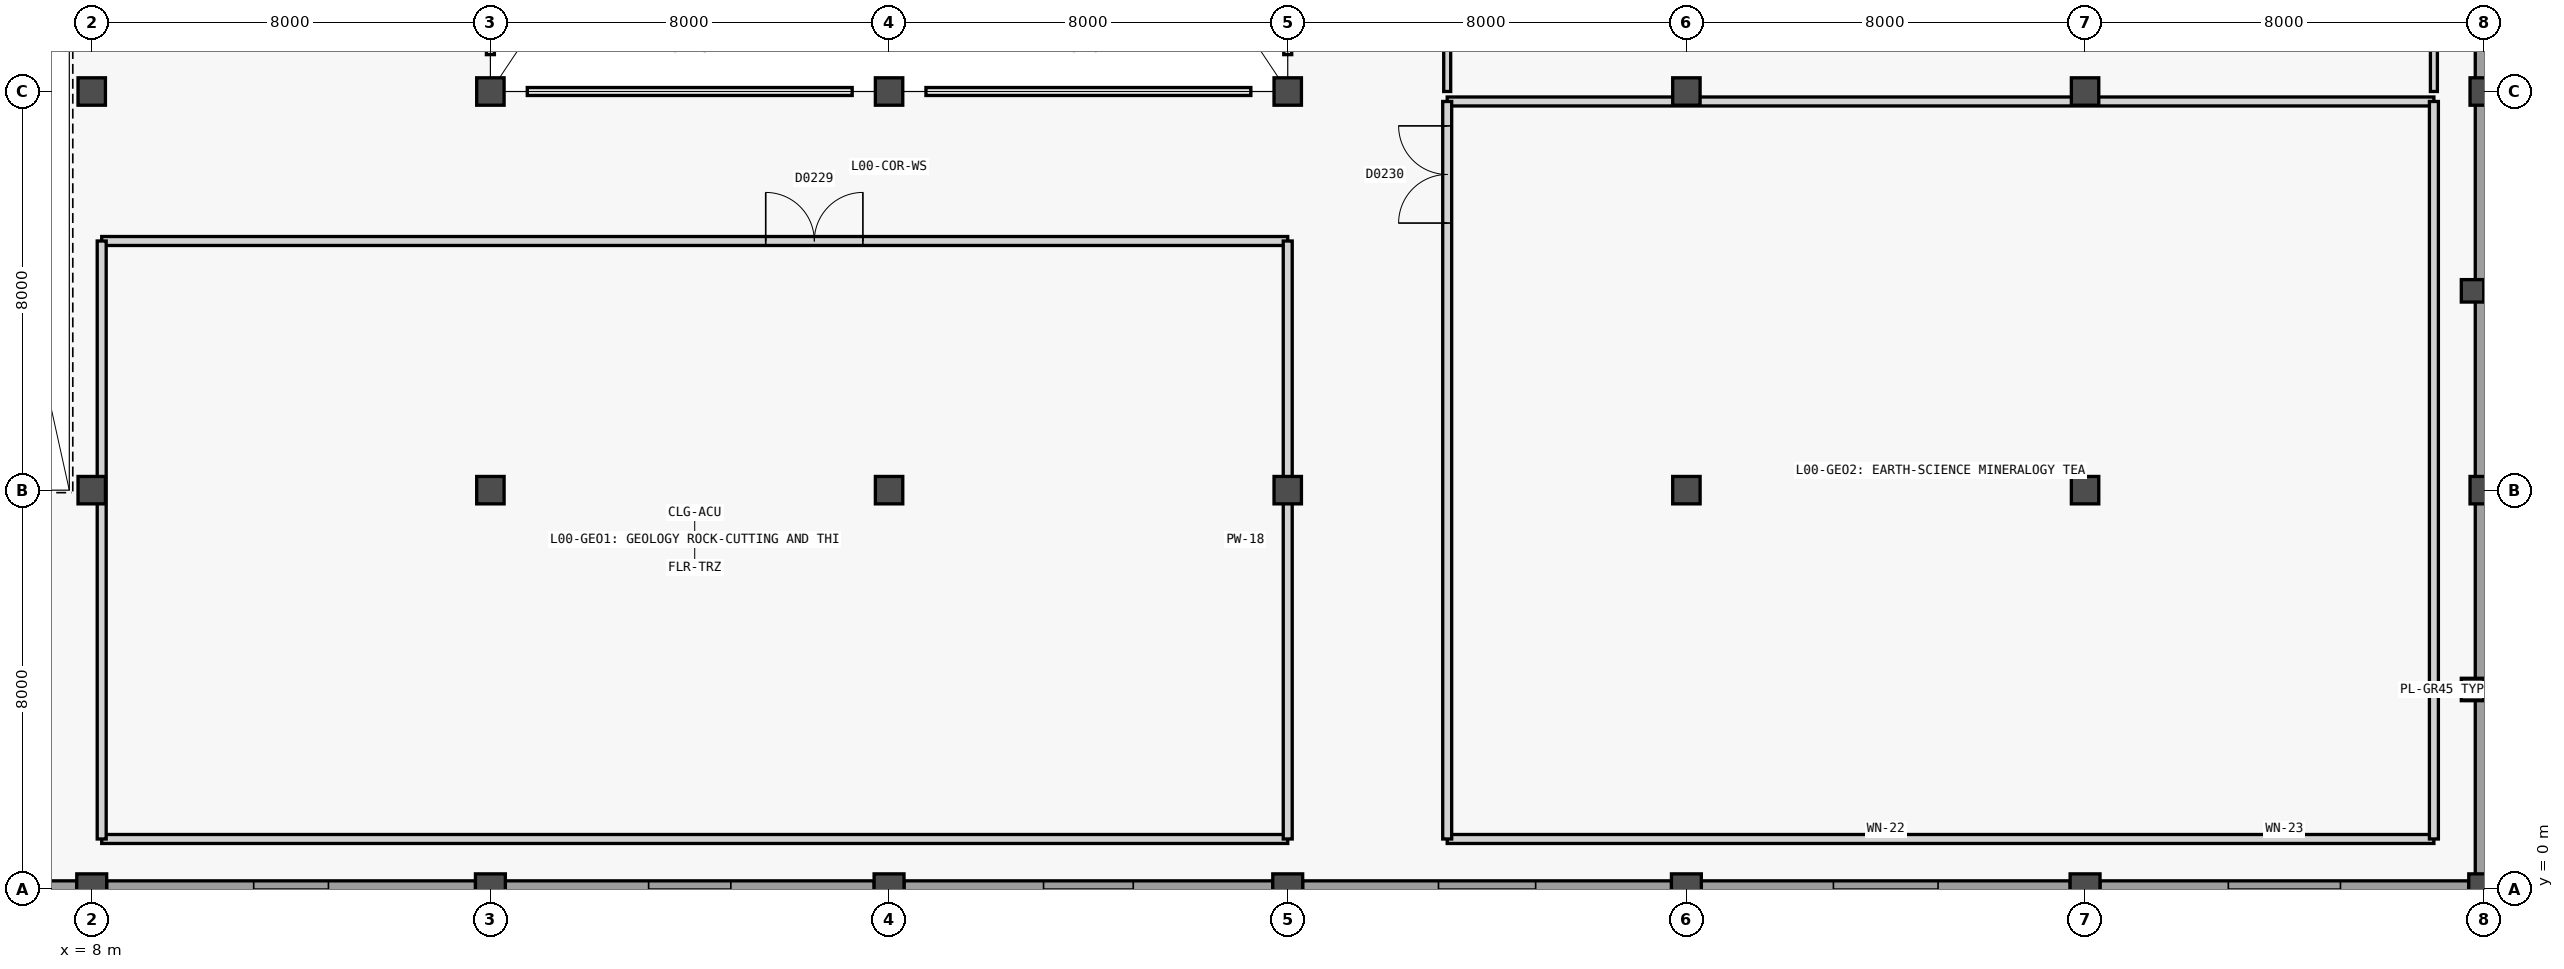
"""IFC4 building model, lengths in metres.
Left out: names, types, materials, properties, quantities, classifications, styles, units other than length and angle.
Written with IfcOpenShell. Run it as: python <this file> out.ifc"""

import sys

from ifc_helpers import new_model, si_unit, direction, frame, frame_2d, origin, origin_2d, place, context, subcontext, project, spatial, rectangle, extrude, element, fill, save


model = new_model("IFC4")
c1 = context("Model", 3, precision=1e-05, world=origin(), true_north=direction((0.0, 1.0)))
c2 = subcontext(c1, "Body", "Model", "MODEL_VIEW")
j1 = project(units=[si_unit("LENGTHUNIT", "METRE"), si_unit("PLANEANGLEUNIT", "RADIAN")], contexts=[c1])
p1 = place(None, origin())
s1 = spatial("IfcSite", under=j1, at=p1, CompositionType="ELEMENT")
p2 = place(p1, origin())
s2 = spatial("IfcBuilding", under=s1, at=p2, CompositionType="ELEMENT")
p3 = place(p2, origin())
s3 = spatial("IfcBuildingStorey", under=s2, at=p3, CompositionType="ELEMENT", Elevation=0.0)
p4 = place(p3, frame((8.0, 0.0, 0.0), z_axis=(0.0, 0.0, 1.0), x_axis=(1.0, 0.0, 0.0)))
e1 = element("IfcColumn", 1, at=p4, inside=s3, PredefinedType="COLUMN", context=c2, shape_type="SweptSolid", body=[
    extrude(rectangle(XDim=0.6, YDim=0.6, at=origin_2d()), origin(), (0.0, 0.0, 1.0), 5.4),
])
for number, where, z_axis, x_axis in (
    (2, (8.0, 8.0, 0.0), (0.0, 0.0, 1.0), (1.0, 0.0, 0.0)),
    (3, (8.0, 16.0, 0.0), (0.0, 0.0, 1.0), (1.0, 0.0, 0.0)),
):
    element("IfcColumn", number, at=place(p3, frame(where, z_axis=z_axis, x_axis=x_axis)), inside=s3, PredefinedType="COLUMN", context=c2, shape_type="SweptSolid", body=[
        extrude(rectangle(XDim=0.55, YDim=0.55, at=origin_2d()), origin(), (0.0, 0.0, 1.0), 5.4),
    ])
p5 = place(p3, frame((16.0, 0.0, 0.0), z_axis=(0.0, 0.0, 1.0), x_axis=(1.0, 0.0, 0.0)))
e4 = element("IfcColumn", 4, at=p5, inside=s3, PredefinedType="COLUMN", context=c2, shape_type="SweptSolid", body=[
    extrude(rectangle(XDim=0.6, YDim=0.6, at=origin_2d()), origin(), (0.0, 0.0, 1.0), 5.4),
])
for number, where, z_axis, x_axis in (
    (5, (16.0, 8.0, 0.0), (0.0, 0.0, 1.0), (1.0, 0.0, 0.0)),
    (6, (16.0, 16.0, 0.0), (0.0, 0.0, 1.0), (1.0, 0.0, 0.0)),
):
    element("IfcColumn", number, at=place(p3, frame(where, z_axis=z_axis, x_axis=x_axis)), inside=s3, PredefinedType="COLUMN", context=c2, shape_type="SweptSolid", body=[
        extrude(rectangle(XDim=0.55, YDim=0.55, at=origin_2d()), origin(), (0.0, 0.0, 1.0), 5.4),
    ])
p6 = place(p3, frame((24.0, 0.0, 0.0), z_axis=(0.0, 0.0, 1.0), x_axis=(1.0, 0.0, 0.0)))
e7 = element("IfcColumn", 7, at=p6, inside=s3, PredefinedType="COLUMN", context=c2, shape_type="SweptSolid", body=[
    extrude(rectangle(XDim=0.6, YDim=0.6, at=origin_2d()), origin(), (0.0, 0.0, 1.0), 5.4),
])
for number, where, z_axis, x_axis in (
    (8, (24.0, 8.0, 0.0), (0.0, 0.0, 1.0), (1.0, 0.0, 0.0)),
    (9, (24.0, 16.0, 0.0), (0.0, 0.0, 1.0), (1.0, 0.0, 0.0)),
):
    element("IfcColumn", number, at=place(p3, frame(where, z_axis=z_axis, x_axis=x_axis)), inside=s3, PredefinedType="COLUMN", context=c2, shape_type="SweptSolid", body=[
        extrude(rectangle(XDim=0.55, YDim=0.55, at=origin_2d()), origin(), (0.0, 0.0, 1.0), 5.4),
    ])
p7 = place(p3, frame((32.0, 0.0, 0.0), z_axis=(0.0, 0.0, 1.0), x_axis=(1.0, 0.0, 0.0)))
e10 = element("IfcColumn", 10, at=p7, inside=s3, PredefinedType="COLUMN", context=c2, shape_type="SweptSolid", body=[
    extrude(rectangle(XDim=0.6, YDim=0.6, at=origin_2d()), origin(), (0.0, 0.0, 1.0), 5.4),
])
for number, where, z_axis, x_axis in (
    (11, (32.0, 8.0, 0.0), (0.0, 0.0, 1.0), (1.0, 0.0, 0.0)),
    (12, (32.0, 16.0, 0.0), (0.0, 0.0, 1.0), (1.0, 0.0, 0.0)),
):
    element("IfcColumn", number, at=place(p3, frame(where, z_axis=z_axis, x_axis=x_axis)), inside=s3, PredefinedType="COLUMN", context=c2, shape_type="SweptSolid", body=[
        extrude(rectangle(XDim=0.55, YDim=0.55, at=origin_2d()), origin(), (0.0, 0.0, 1.0), 5.4),
    ])
p8 = place(p3, frame((40.0, 0.0, 0.0), z_axis=(0.0, 0.0, 1.0), x_axis=(1.0, 0.0, 0.0)))
e13 = element("IfcColumn", 13, at=p8, inside=s3, PredefinedType="COLUMN", context=c2, shape_type="SweptSolid", body=[
    extrude(rectangle(XDim=0.6, YDim=0.6, at=origin_2d()), origin(), (0.0, 0.0, 1.0), 5.4),
])
for number, where, z_axis, x_axis in (
    (14, (40.0, 8.0, 0.0), (0.0, 0.0, 1.0), (1.0, 0.0, 0.0)),
    (15, (40.0, 16.0, 0.0), (0.0, 0.0, 1.0), (1.0, 0.0, 0.0)),
):
    element("IfcColumn", number, at=place(p3, frame(where, z_axis=z_axis, x_axis=x_axis)), inside=s3, PredefinedType="COLUMN", context=c2, shape_type="SweptSolid", body=[
        extrude(rectangle(XDim=0.55, YDim=0.55, at=origin_2d()), origin(), (0.0, 0.0, 1.0), 5.4),
    ])
p9 = place(p3, frame((48.0, 0.0, 0.0), z_axis=(0.0, 0.0, 1.0), x_axis=(1.0, 0.0, 0.0)))
e16 = element("IfcColumn", 16, at=p9, inside=s3, PredefinedType="COLUMN", context=c2, shape_type="SweptSolid", body=[
    extrude(rectangle(XDim=0.6, YDim=0.6, at=origin_2d()), origin(), (0.0, 0.0, 1.0), 5.4),
])
for number, where, z_axis, x_axis in (
    (17, (48.0, 8.0, 0.0), (0.0, 0.0, 1.0), (1.0, 0.0, 0.0)),
    (18, (48.0, 16.0, 0.0), (0.0, 0.0, 1.0), (1.0, 0.0, 0.0)),
):
    element("IfcColumn", number, at=place(p3, frame(where, z_axis=z_axis, x_axis=x_axis)), inside=s3, PredefinedType="COLUMN", context=c2, shape_type="SweptSolid", body=[
        extrude(rectangle(XDim=0.55, YDim=0.55, at=origin_2d()), origin(), (0.0, 0.0, 1.0), 5.4),
    ])
p10 = place(p3, frame((56.0, 0.0, 0.0), z_axis=(0.0, 0.0, 1.0), x_axis=(1.0, 0.0, 0.0)))
e19 = element("IfcColumn", 19, at=p10, inside=s3, PredefinedType="COLUMN", context=c2, shape_type="SweptSolid", body=[
    extrude(rectangle(XDim=0.6, YDim=0.6, at=origin_2d()), origin(), (0.0, 0.0, 1.0), 5.4),
])
for number, where, z_axis, x_axis in (
    (20, (56.0, 8.0, 0.0), (0.0, 0.0, 1.0), (1.0, 0.0, 0.0)),
    (21, (56.0, 16.0, 0.0), (0.0, 0.0, 1.0), (1.0, 0.0, 0.0)),
):
    element("IfcColumn", number, at=place(p3, frame(where, z_axis=z_axis, x_axis=x_axis)), inside=s3, PredefinedType="COLUMN", context=c2, shape_type="SweptSolid", body=[
        extrude(rectangle(XDim=0.55, YDim=0.55, at=origin_2d()), origin(), (0.0, 0.0, 1.0), 5.4),
    ])
for number, where, z_axis, x_axis in (
    (22, (55.775, 4.0, 0.0), (0.0, 0.0, 1.0), (1.0, 0.0, 0.0)),
    (23, (55.775, 12.0, 0.0), (0.0, 0.0, 1.0), (1.0, 0.0, 0.0)),
):
    element("IfcColumn", number, at=place(p3, frame(where, z_axis=z_axis, x_axis=x_axis)), inside=s3, PredefinedType="PILASTER", context=c2, shape_type="SweptSolid", body=[
        extrude(rectangle(XDim=0.45, YDim=0.45, at=origin_2d()), origin(), (0.0, 0.0, 1.0), 5.4),
    ])
p11 = place(p3, frame((56.0, 64.0, 0.0), z_axis=(0.0, 0.0, 1.0), x_axis=(0.0, -1.0, 0.0)))
e24 = element("IfcWall", 24, at=p11, inside=s3, PredefinedType="SOLIDWALL", context=c2, shape_type="SweptSolid", body=[
    extrude(rectangle(XDim=64.0, YDim=0.34, at=frame_2d((32.0, 0.0))), origin(), (0.0, 0.0, 1.0), 5.16),
])
p12 = place(p3, frame((7.702, 0.0, 0.0), z_axis=(0.0, 0.0, 1.0), x_axis=(-1.0, 0.0, 0.0)))
e25 = element("IfcWall", 25, at=p12, inside=s3, PredefinedType="SOLIDWALL", context=c2, shape_type="SweptSolid", body=[
    extrude(rectangle(XDim=7.404, YDim=0.32, at=frame_2d((3.702, 0.0))), origin(), (0.0, 0.0, 1.0), 5.14),
])
p13 = place(p12, frame((3.027, 0.0, 0.88)))
e26 = element("IfcOpeningElement", 26, at=p13, cuts=e25, PredefinedType="OPENING", context=c2, shape_type="SweptSolid", body=[
    extrude(rectangle(XDim=1.35, YDim=1.45, at=frame_2d((0.675, 0.725))), frame((0.0, 0.17, 0.0), z_axis=(0.0, -1.0, 0.0), x_axis=(1.0, 0.0, 0.0)), (0.0, 0.0, 1.0), 0.34),
])
p14 = place(p3, frame((15.702, 0.0, 0.0), z_axis=(0.0, 0.0, 1.0), x_axis=(-1.0, 0.0, 0.0)))
e27 = element("IfcWall", 27, at=p14, inside=s3, PredefinedType="SOLIDWALL", context=c2, shape_type="SweptSolid", body=[
    extrude(rectangle(XDim=7.404, YDim=0.32, at=frame_2d((3.702, 0.0))), origin(), (0.0, 0.0, 1.0), 5.14),
])
p15 = place(p14, frame((2.952, 0.0, 0.88)))
e28 = element("IfcOpeningElement", 28, at=p15, cuts=e27, PredefinedType="OPENING", context=c2, shape_type="SweptSolid", body=[
    extrude(rectangle(XDim=1.5, YDim=1.5, at=frame_2d((0.75, 0.75))), frame((0.0, 0.17, 0.0), z_axis=(0.0, -1.0, 0.0), x_axis=(1.0, 0.0, 0.0)), (0.0, 0.0, 1.0), 0.34),
])
p16 = place(p3, frame((23.702, 0.0, 0.0), z_axis=(0.0, 0.0, 1.0), x_axis=(-1.0, 0.0, 0.0)))
e29 = element("IfcWall", 29, at=p16, inside=s3, PredefinedType="SOLIDWALL", context=c2, shape_type="SweptSolid", body=[
    extrude(rectangle(XDim=7.404, YDim=0.32, at=frame_2d((3.702, 0.0))), origin(), (0.0, 0.0, 1.0), 5.14),
])
p17 = place(p16, frame((2.877, 0.0, 0.88)))
e30 = element("IfcOpeningElement", 30, at=p17, cuts=e29, PredefinedType="OPENING", context=c2, shape_type="SweptSolid", body=[
    extrude(rectangle(XDim=1.65, YDim=1.5, at=frame_2d((0.825, 0.75))), frame((0.0, 0.17, 0.0), z_axis=(0.0, -1.0, 0.0), x_axis=(1.0, 0.0, 0.0)), (0.0, 0.0, 1.0), 0.34),
])
p18 = place(p3, frame((31.702, 0.0, 0.0), z_axis=(0.0, 0.0, 1.0), x_axis=(-1.0, 0.0, 0.0)))
e31 = element("IfcWall", 31, at=p18, inside=s3, PredefinedType="SOLIDWALL", context=c2, shape_type="SweptSolid", body=[
    extrude(rectangle(XDim=7.404, YDim=0.32, at=frame_2d((3.702, 0.0))), origin(), (0.0, 0.0, 1.0), 5.14),
])
p19 = place(p18, frame((2.802, 0.0, 0.88)))
e32 = element("IfcOpeningElement", 32, at=p19, cuts=e31, PredefinedType="OPENING", context=c2, shape_type="SweptSolid", body=[
    extrude(rectangle(XDim=1.8, YDim=1.55, at=frame_2d((0.9, 0.775))), frame((0.0, 0.17, 0.0), z_axis=(0.0, -1.0, 0.0), x_axis=(1.0, 0.0, 0.0)), (0.0, 0.0, 1.0), 0.34),
])
p20 = place(p3, frame((39.702, 0.0, 0.0), z_axis=(0.0, 0.0, 1.0), x_axis=(-1.0, 0.0, 0.0)))
e33 = element("IfcWall", 33, at=p20, inside=s3, PredefinedType="SOLIDWALL", context=c2, shape_type="SweptSolid", body=[
    extrude(rectangle(XDim=7.404, YDim=0.32, at=frame_2d((3.702, 0.0))), origin(), (0.0, 0.0, 1.0), 5.14),
])
p21 = place(p20, frame((2.727, 0.0, 0.88)))
e34 = element("IfcOpeningElement", 34, at=p21, cuts=e33, PredefinedType="OPENING", context=c2, shape_type="SweptSolid", body=[
    extrude(rectangle(XDim=1.95, YDim=1.55, at=frame_2d((0.975, 0.775))), frame((0.0, 0.17, 0.0), z_axis=(0.0, -1.0, 0.0), x_axis=(1.0, 0.0, 0.0)), (0.0, 0.0, 1.0), 0.34),
])
p22 = place(p3, frame((47.702, 0.0, 0.0), z_axis=(0.0, 0.0, 1.0), x_axis=(-1.0, 0.0, 0.0)))
e35 = element("IfcWall", 35, at=p22, inside=s3, PredefinedType="SOLIDWALL", context=c2, shape_type="SweptSolid", body=[
    extrude(rectangle(XDim=7.404, YDim=0.32, at=frame_2d((3.702, 0.0))), origin(), (0.0, 0.0, 1.0), 5.14),
])
p23 = place(p22, frame((2.652, 0.0, 0.88)))
e36 = element("IfcOpeningElement", 36, at=p23, cuts=e35, PredefinedType="OPENING", context=c2, shape_type="SweptSolid", body=[
    extrude(rectangle(XDim=2.1, YDim=1.6, at=frame_2d((1.05, 0.8))), frame((0.0, 0.17, 0.0), z_axis=(0.0, -1.0, 0.0), x_axis=(1.0, 0.0, 0.0)), (0.0, 0.0, 1.0), 0.34),
])
p24 = place(p3, frame((55.702, 0.0, 0.0), z_axis=(0.0, 0.0, 1.0), x_axis=(-1.0, 0.0, 0.0)))
e37 = element("IfcWall", 37, at=p24, inside=s3, PredefinedType="SOLIDWALL", context=c2, shape_type="SweptSolid", body=[
    extrude(rectangle(XDim=7.404, YDim=0.32, at=frame_2d((3.702, 0.0))), origin(), (0.0, 0.0, 1.0), 5.14),
])
p25 = place(p24, frame((2.577, 0.0, 0.88)))
e38 = element("IfcOpeningElement", 38, at=p25, cuts=e37, PredefinedType="OPENING", context=c2, shape_type="SweptSolid", body=[
    extrude(rectangle(XDim=2.25, YDim=1.6, at=frame_2d((1.125, 0.8))), frame((0.0, 0.17, 0.0), z_axis=(0.0, -1.0, 0.0), x_axis=(1.0, 0.0, 0.0)), (0.0, 0.0, 1.0), 0.34),
])
p26 = place(p3, frame((8.2, 1.0, 0.0), z_axis=(0.0, 0.0, 1.0), x_axis=(1.0, 0.0, 0.0)))
e39 = element("IfcWall", 39, at=p26, inside=s3, PredefinedType="PARTITIONING", context=c2, shape_type="SweptSolid", body=[
    extrude(rectangle(XDim=23.8, YDim=0.18, at=frame_2d((11.9, 0.0))), origin(), (0.0, 0.0, 1.0), 5.14),
])
p27 = place(p3, frame((8.2, 13.0, 0.0), z_axis=(0.0, 0.0, 1.0), x_axis=(1.0, 0.0, 0.0)))
e40 = element("IfcWall", 40, at=p27, inside=s3, PredefinedType="PARTITIONING", context=c2, shape_type="SweptSolid", body=[
    extrude(rectangle(XDim=23.8, YDim=0.18, at=frame_2d((11.9, 0.0))), origin(), (0.0, 0.0, 1.0), 5.14),
])
p28 = place(p27, frame((13.325, 0.0, 0.0)))
e41 = element("IfcOpeningElement", 41, at=p28, cuts=e40, PredefinedType="OPENING", context=c2, shape_type="SweptSolid", body=[
    extrude(rectangle(XDim=1.95, YDim=2.35, at=frame_2d((0.975, 1.175))), frame((0.0, 0.1, 0.0), z_axis=(0.0, -1.0, 0.0), x_axis=(1.0, 0.0, 0.0)), (0.0, 0.0, 1.0), 0.2),
])
for number, where, z_axis, x_axis in (
    (42, (8.2, 1.0, 0.0), (0.0, 0.0, 1.0), (0.0, 1.0, 0.0)),
    (43, (32.0, 1.0, 0.0), (0.0, 0.0, 1.0), (0.0, 1.0, 0.0)),
):
    element("IfcWall", number, at=place(p3, frame(where, z_axis=z_axis, x_axis=x_axis)), inside=s3, PredefinedType="PARTITIONING", context=c2, shape_type="SweptSolid", body=[
        extrude(rectangle(XDim=12.0, YDim=0.18, at=frame_2d((6.0, 0.0))), origin(), (0.0, 0.0, 1.0), 4.47),
    ])
p29 = place(p3, frame((35.2, 1.0, 0.0), z_axis=(0.0, 0.0, 1.0), x_axis=(1.0, 0.0, 0.0)))
e44 = element("IfcWall", 44, at=p29, inside=s3, PredefinedType="PARTITIONING", context=c2, shape_type="SweptSolid", body=[
    extrude(rectangle(XDim=19.8, YDim=0.18, at=frame_2d((9.9, 0.0))), origin(), (0.0, 0.0, 1.0), 5.14),
])
p30 = place(p3, frame((35.2, 15.8, 0.0), z_axis=(0.0, 0.0, 1.0), x_axis=(1.0, 0.0, 0.0)))
e45 = element("IfcWall", 45, at=p30, inside=s3, PredefinedType="PARTITIONING", context=c2, shape_type="SweptSolid", body=[
    extrude(rectangle(XDim=19.8, YDim=0.18, at=frame_2d((9.9, 0.0))), origin(), (0.0, 0.0, 1.0), 4.37),
])
p31 = place(p3, frame((35.2, 1.0, 0.0), z_axis=(0.0, 0.0, 1.0), x_axis=(0.0, 1.0, 0.0)))
e46 = element("IfcWall", 46, at=p31, inside=s3, PredefinedType="PARTITIONING", context=c2, shape_type="SweptSolid", body=[
    extrude(rectangle(XDim=14.8, YDim=0.18, at=frame_2d((7.4, 0.0))), origin(), (0.0, 0.0, 1.0), 5.14),
])
p32 = place(p31, frame((12.36, 0.0, 0.0)))
e47 = element("IfcOpeningElement", 47, at=p32, cuts=e46, PredefinedType="OPENING", context=c2, shape_type="SweptSolid", body=[
    extrude(rectangle(XDim=1.95, YDim=2.35, at=frame_2d((0.975, 1.175))), frame((0.0, 0.1, 0.0), z_axis=(0.0, -1.0, 0.0), x_axis=(1.0, 0.0, 0.0)), (0.0, 0.0, 1.0), 0.2),
])
p33 = place(p3, frame((55.0, 1.0, 0.0), z_axis=(0.0, 0.0, 1.0), x_axis=(0.0, 1.0, 0.0)))
e48 = element("IfcWall", 48, at=p33, inside=s3, PredefinedType="PARTITIONING", context=c2, shape_type="SweptSolid", body=[
    extrude(rectangle(XDim=14.8, YDim=0.18, at=frame_2d((7.4, 0.0))), origin(), (0.0, 0.0, 1.0), 5.14),
])
p34 = place(p3, frame((35.2, 16.0, 0.0), z_axis=(0.0, 0.0, 1.0), x_axis=(0.0, 1.0, 0.0)))
e49 = element("IfcWall", 49, at=p34, inside=s3, PredefinedType="PARTITIONING", context=c2, shape_type="SweptSolid", body=[
    extrude(rectangle(XDim=23.8, YDim=0.14, at=frame_2d((11.9, 0.0))), origin(), (0.0, 0.0, 1.0), 5.14),
])
p35 = place(p34, frame((11.44, 0.0, 0.0)))
e50 = element("IfcOpeningElement", 50, at=p35, cuts=e49, PredefinedType="OPENING", context=c2, shape_type="SweptSolid", body=[
    extrude(rectangle(XDim=0.92, YDim=2.15, at=frame_2d((0.46, 1.075))), frame((0.0, 0.08, 0.0), z_axis=(0.0, -1.0, 0.0), x_axis=(1.0, 0.0, 0.0)), (0.0, 0.0, 1.0), 0.16),
])
p36 = place(p3, frame((55.0, 16.0, 0.0), z_axis=(0.0, 0.0, 1.0), x_axis=(0.0, 1.0, 0.0)))
e51 = element("IfcWall", 51, at=p36, inside=s3, PredefinedType="PARTITIONING", context=c2, shape_type="SweptSolid", body=[
    extrude(rectangle(XDim=23.8, YDim=0.14, at=frame_2d((11.9, 0.0))), origin(), (0.0, 0.0, 1.0), 5.14),
])
p37 = place(p15, origin())
e52 = element("IfcWindow", 52, at=p37, inside=s3, PartitioningType="SINGLE_PANEL", PredefinedType="WINDOW", context=c2, shape_type="SweptSolid", body=[
    extrude(rectangle(XDim=1.5, YDim=1.5, at=frame_2d((0.75, 0.75))), frame((0.0, 0.03, 0.0), z_axis=(0.0, -1.0, 0.0), x_axis=(1.0, 0.0, 0.0)), (0.0, 0.0, 1.0), 0.06),
])
fill(e28, e52)
p38 = place(p17, origin())
e53 = element("IfcWindow", 53, at=p38, inside=s3, PartitioningType="SINGLE_PANEL", PredefinedType="WINDOW", context=c2, shape_type="SweptSolid", body=[
    extrude(rectangle(XDim=1.65, YDim=1.5, at=frame_2d((0.825, 0.75))), frame((0.0, 0.03, 0.0), z_axis=(0.0, -1.0, 0.0), x_axis=(1.0, 0.0, 0.0)), (0.0, 0.0, 1.0), 0.06),
])
fill(e30, e53)
p39 = place(p19, origin())
e54 = element("IfcWindow", 54, at=p39, inside=s3, PartitioningType="SINGLE_PANEL", PredefinedType="WINDOW", context=c2, shape_type="SweptSolid", body=[
    extrude(rectangle(XDim=1.8, YDim=1.55, at=frame_2d((0.9, 0.775))), frame((0.0, 0.03, 0.0), z_axis=(0.0, -1.0, 0.0), x_axis=(1.0, 0.0, 0.0)), (0.0, 0.0, 1.0), 0.06),
])
fill(e32, e54)
p40 = place(p21, origin())
e55 = element("IfcWindow", 55, at=p40, inside=s3, PartitioningType="SINGLE_PANEL", PredefinedType="WINDOW", context=c2, shape_type="SweptSolid", body=[
    extrude(rectangle(XDim=1.95, YDim=1.55, at=frame_2d((0.975, 0.775))), frame((0.0, 0.03, 0.0), z_axis=(0.0, -1.0, 0.0), x_axis=(1.0, 0.0, 0.0)), (0.0, 0.0, 1.0), 0.06),
])
fill(e34, e55)
p41 = place(p23, origin())
e56 = element("IfcWindow", 56, at=p41, inside=s3, PartitioningType="SINGLE_PANEL", PredefinedType="WINDOW", context=c2, shape_type="SweptSolid", body=[
    extrude(rectangle(XDim=2.1, YDim=1.6, at=frame_2d((1.05, 0.8))), frame((0.0, 0.03, 0.0), z_axis=(0.0, -1.0, 0.0), x_axis=(1.0, 0.0, 0.0)), (0.0, 0.0, 1.0), 0.06),
])
fill(e36, e56)
p42 = place(p25, origin())
e57 = element("IfcWindow", 57, at=p42, inside=s3, PartitioningType="SINGLE_PANEL", PredefinedType="WINDOW", context=c2, shape_type="SweptSolid", body=[
    extrude(rectangle(XDim=2.25, YDim=1.6, at=frame_2d((1.125, 0.8))), frame((0.0, 0.03, 0.0), z_axis=(0.0, -1.0, 0.0), x_axis=(1.0, 0.0, 0.0)), (0.0, 0.0, 1.0), 0.06),
])
fill(e38, e57)
p43 = place(p28, origin())
e58 = element("IfcDoor", 58, at=p43, inside=s3, OperationType="DOUBLE_DOOR_SINGLE_SWING", PredefinedType="DOOR", context=c2, shape_type="SweptSolid", body=[
    extrude(rectangle(XDim=1.95, YDim=2.35, at=frame_2d((0.975, 1.175))), frame((0.0, 0.025, 0.0), z_axis=(0.0, -1.0, 0.0), x_axis=(1.0, 0.0, 0.0)), (0.0, 0.0, 1.0), 0.05),
])
fill(e41, e58)
p44 = place(p32, origin())
e59 = element("IfcDoor", 59, at=p44, inside=s3, OperationType="DOUBLE_DOOR_SINGLE_SWING", PredefinedType="DOOR", context=c2, shape_type="SweptSolid", body=[
    extrude(rectangle(XDim=1.95, YDim=2.35, at=frame_2d((0.975, 1.175))), frame((0.0, 0.025, 0.0), z_axis=(0.0, -1.0, 0.0), x_axis=(1.0, 0.0, 0.0)), (0.0, 0.0, 1.0), 0.05),
])
fill(e47, e59)
save(model, sys.argv[1])
